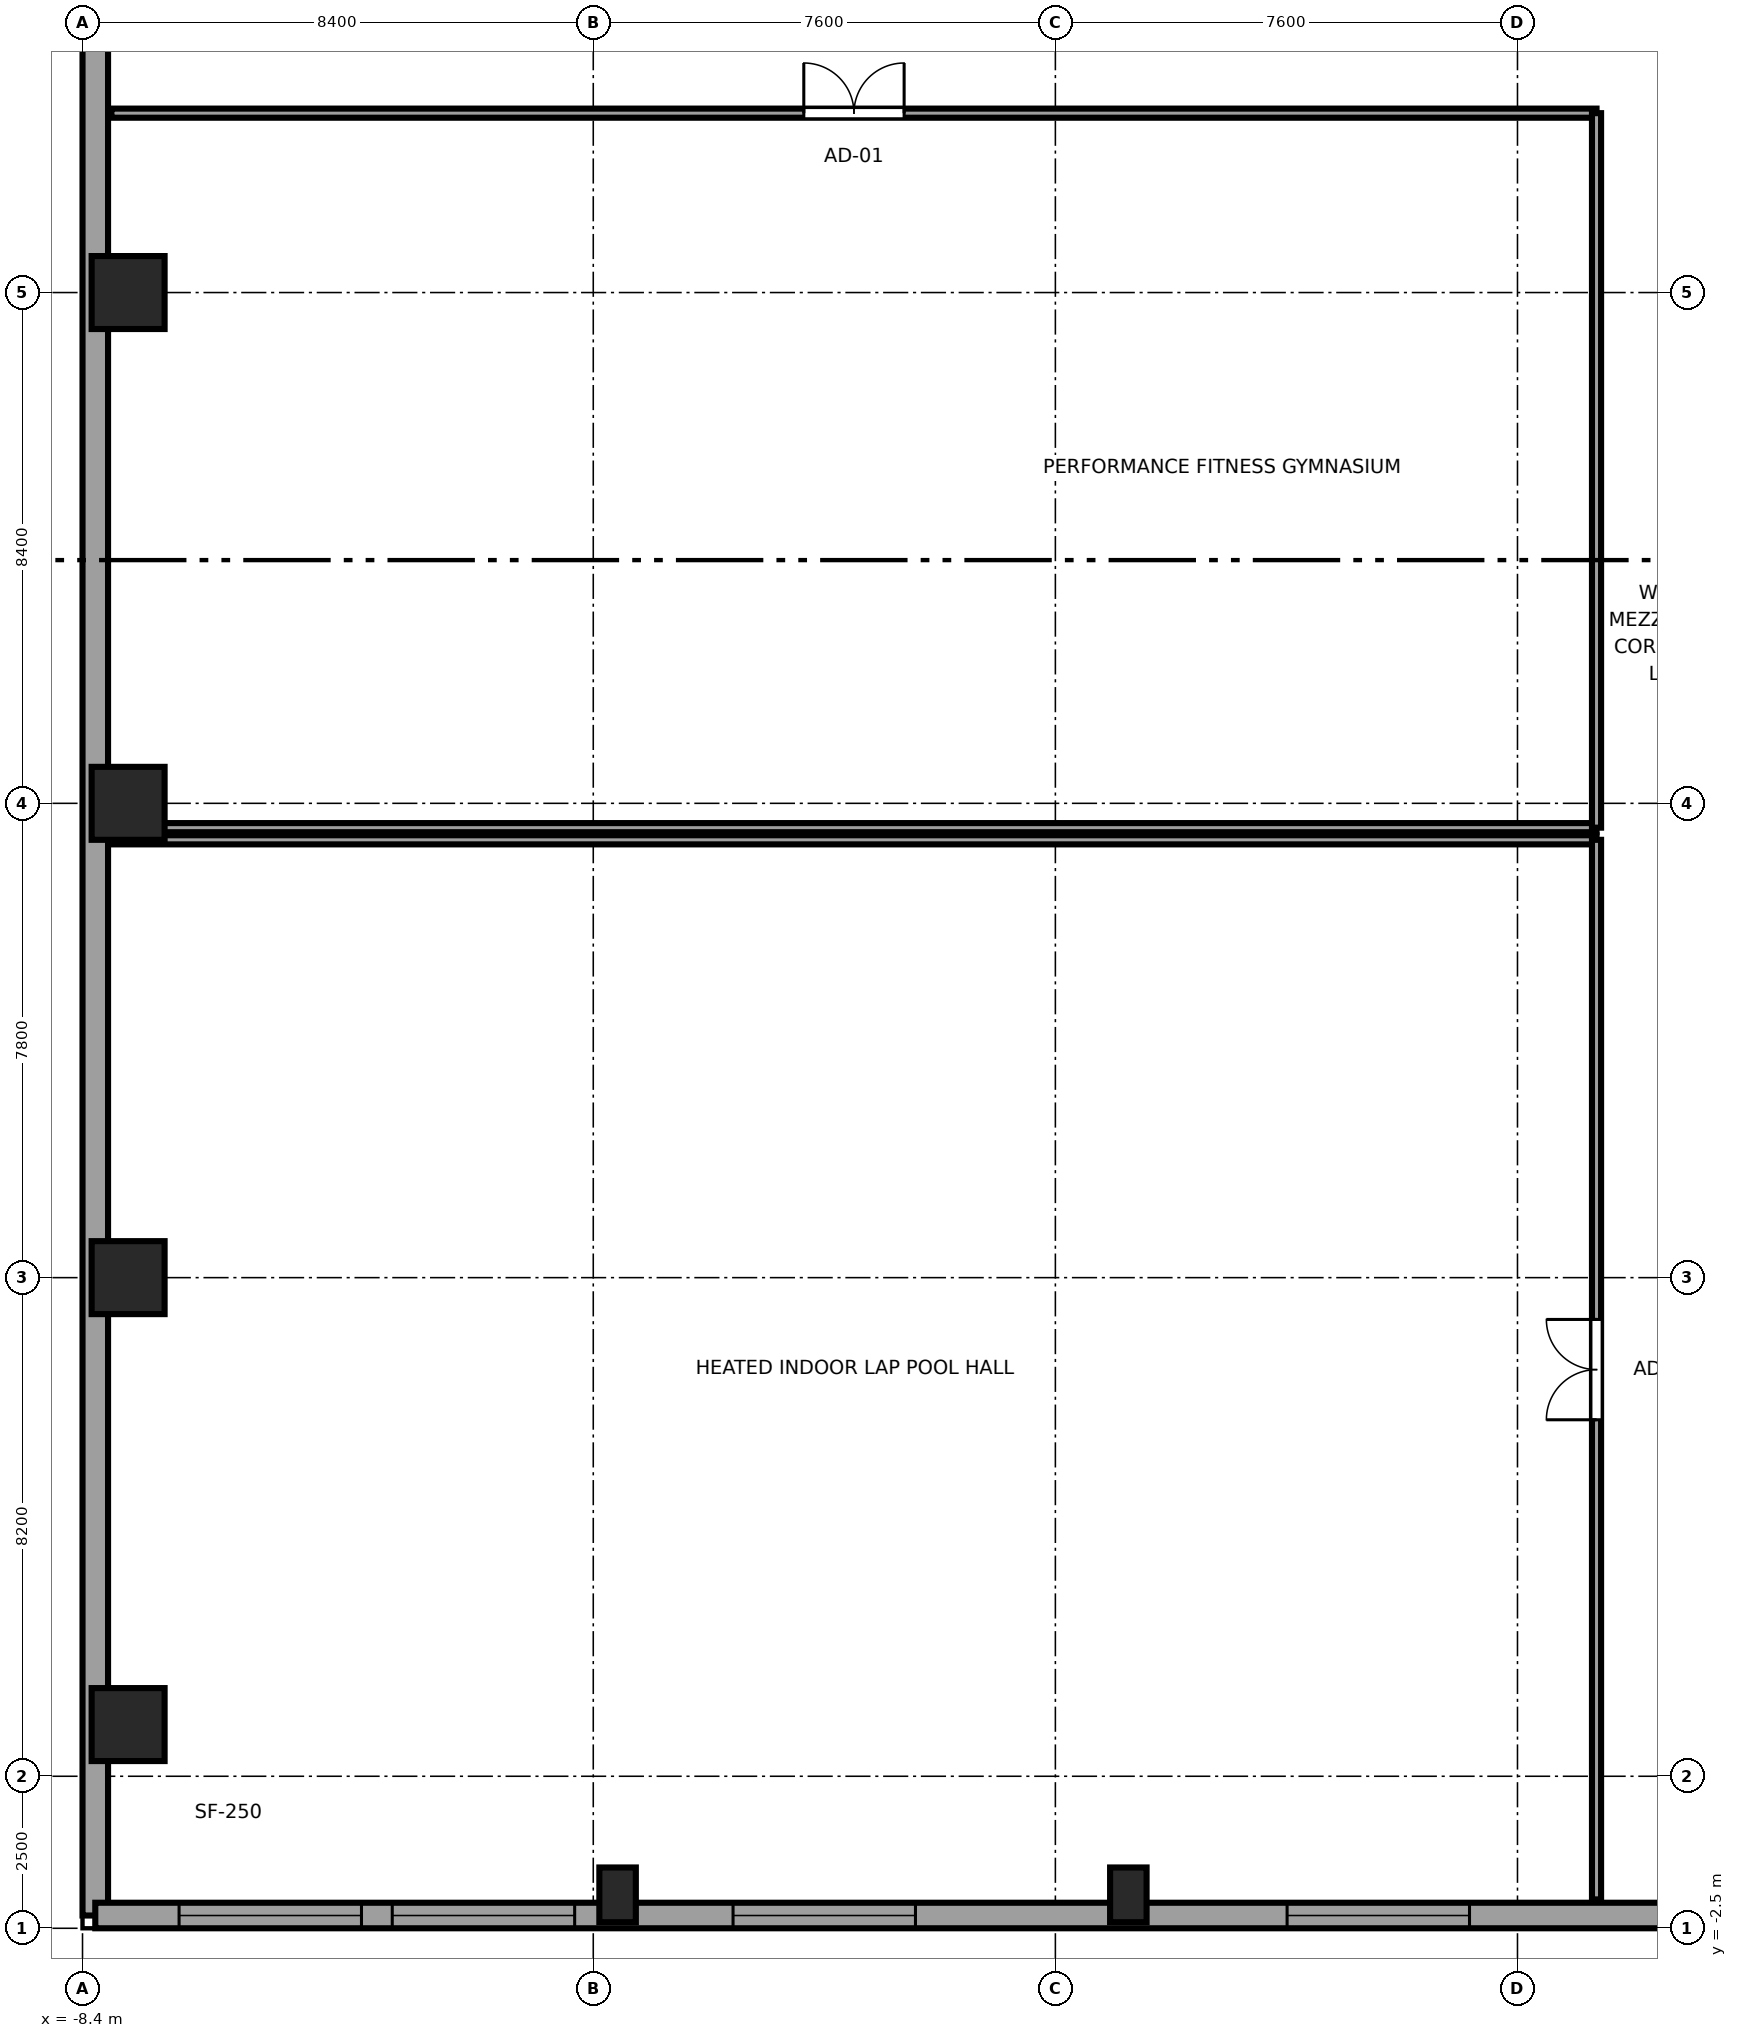
"""IFC4 building model, lengths in metres.
Left out: names, types, materials, properties, quantities, classifications, styles, units other than length and angle.
Written with IfcOpenShell. Run it as: python <this file> out.ifc"""

import sys

from ifc_helpers import new_model, si_unit, direction, frame, frame_2d, origin, origin_2d, place, context, subcontext, project, spatial, rectangle, extrude, source, transform, mapped, element, fill, save


model = new_model("IFC4")
c1 = context("Model", 3, precision=1e-05, world=origin(), true_north=direction((0.0, 1.0)))
c2 = subcontext(c1, "Body", "Model", "MODEL_VIEW")
j1 = project(units=[si_unit("LENGTHUNIT", "METRE"), si_unit("PLANEANGLEUNIT", "RADIAN")], contexts=[c1])
p1 = place(None, origin())
s1 = spatial("IfcSite", under=j1, at=p1, CompositionType="ELEMENT")
p2 = place(p1, origin())
s2 = spatial("IfcBuilding", under=s1, at=p2, CompositionType="ELEMENT")
p3 = place(p2, frame((0.0, 0.0, 26.8)))
s3 = spatial("IfcBuildingStorey", under=s2, at=p3, CompositionType="ELEMENT", Elevation=26.8)
m1 = source(origin(), c2, "Body", "SweptSolid", [
    extrude(rectangle(XDim=1.2, YDim=1.2, at=origin_2d()), origin(), (0.0, 0.0, 1.0), 5.2),
])
for number, where, z_axis, x_axis in (
    (1, (-7.65, 0.85, 0.0), (0.0, 0.0, 1.0), (1.0, 0.0, 0.0)),
    (2, (-7.65, 8.2, 0.0), (0.0, 0.0, 1.0), (1.0, 0.0, 0.0)),
    (3, (-7.65, 16.0, 0.0), (0.0, 0.0, 1.0), (1.0, 0.0, 0.0)),
    (4, (-7.65, 24.4, 0.0), (0.0, 0.0, 1.0), (1.0, 0.0, 0.0)),
):
    element("IfcColumn", number, at=place(p3, frame(where, z_axis=z_axis, x_axis=x_axis)), inside=s3, PredefinedType="COLUMN", context=c2, shape_type="MappedRepresentation", body=[
        mapped(m1, transform((0.0, 0.0, 0.0), x_axis=(1.0, 0.0, 0.0), y_axis=(0.0, 1.0, 0.0), z_axis=(0.0, 0.0, 1.0), scale=1.0)),
    ])
m2 = source(origin(), c2, "Body", "SweptSolid", [
    extrude(rectangle(XDim=0.6, YDim=0.9, at=origin_2d()), origin(), (0.0, 0.0, 1.0), 5.2),
])
for number, where, z_axis, x_axis in (
    (5, (0.4, -1.95, 0.0), (0.0, 0.0, 1.0), (1.0, 0.0, 0.0)),
    (6, (8.8, -1.95, 0.0), (0.0, 0.0, 1.0), (1.0, 0.0, 0.0)),
):
    element("IfcColumn", number, at=place(p3, frame(where, z_axis=z_axis, x_axis=x_axis)), inside=s3, PredefinedType="PILASTER", context=c2, shape_type="MappedRepresentation", body=[
        mapped(m2, transform((0.0, 0.0, 0.0), x_axis=(1.0, 0.0, 0.0), y_axis=(0.0, 1.0, 0.0), z_axis=(0.0, 0.0, 1.0), scale=1.0)),
    ])
p4 = place(p3, frame((-8.19, 48.29, 0.0), z_axis=(0.0, 0.0, 1.0), x_axis=(0.0, -1.0, 0.0)))
e7 = element("IfcWall", 7, at=p4, inside=s3, PredefinedType="SOLIDWALL", context=c2, shape_type="SweptSolid", body=[
    extrude(rectangle(XDim=50.58, YDim=0.42, at=frame_2d((25.29, 0.0))), origin(), (0.0, 0.0, 1.0), 4.94),
])
p5 = place(p3, frame((-8.19, -2.29, 0.0), z_axis=(0.0, 0.0, 1.0), x_axis=(1.0, 0.0, 0.0)))
e8 = element("IfcWall", 8, at=p5, inside=s3, PredefinedType="SOLIDWALL", context=c2, shape_type="SweptSolid", body=[
    extrude(rectangle(XDim=64.98, YDim=0.42, at=frame_2d((32.49, 0.0))), origin(), (0.0, 0.0, 1.0), 4.94),
])
p6 = place(p5, frame((1.378, 0.0, 0.65)))
e9 = element("IfcOpeningElement", 9, at=p6, cuts=e8, PredefinedType="OPENING", context=c2, shape_type="SweptSolid", body=[
    extrude(rectangle(XDim=3.0, YDim=2.5, at=frame_2d((1.5, 1.25))), frame((0.0, 0.22, 0.0), z_axis=(0.0, -1.0, 0.0), x_axis=(1.0, 0.0, 0.0)), (0.0, 0.0, 1.0), 0.44),
])
p7 = place(p5, frame((4.884, 0.0, 0.65)))
e10 = element("IfcOpeningElement", 10, at=p7, cuts=e8, PredefinedType="OPENING", context=c2, shape_type="SweptSolid", body=[
    extrude(rectangle(XDim=3.0, YDim=2.5, at=frame_2d((1.5, 1.25))), frame((0.0, 0.22, 0.0), z_axis=(0.0, -1.0, 0.0), x_axis=(1.0, 0.0, 0.0)), (0.0, 0.0, 1.0), 0.44),
])
p8 = place(p5, frame((10.489, 0.0, 0.65)))
e11 = element("IfcOpeningElement", 11, at=p8, cuts=e8, PredefinedType="OPENING", context=c2, shape_type="SweptSolid", body=[
    extrude(rectangle(XDim=3.0, YDim=2.5, at=frame_2d((1.5, 1.25))), frame((0.0, 0.22, 0.0), z_axis=(0.0, -1.0, 0.0), x_axis=(1.0, 0.0, 0.0)), (0.0, 0.0, 1.0), 0.44),
])
p9 = place(p5, frame((19.601, 0.0, 0.65)))
e12 = element("IfcOpeningElement", 12, at=p9, cuts=e8, PredefinedType="OPENING", context=c2, shape_type="SweptSolid", body=[
    extrude(rectangle(XDim=3.0, YDim=2.5, at=frame_2d((1.5, 1.25))), frame((0.0, 0.22, 0.0), z_axis=(0.0, -1.0, 0.0), x_axis=(1.0, 0.0, 0.0)), (0.0, 0.0, 1.0), 0.44),
])
p10 = place(p5, frame((28.712, 0.0, 0.65)))
e13 = element("IfcOpeningElement", 13, at=p10, cuts=e8, PredefinedType="OPENING", context=c2, shape_type="SweptSolid", body=[
    extrude(rectangle(XDim=3.0, YDim=2.5, at=frame_2d((1.5, 1.25))), frame((0.0, 0.22, 0.0), z_axis=(0.0, -1.0, 0.0), x_axis=(1.0, 0.0, 0.0)), (0.0, 0.0, 1.0), 0.44),
])
p11 = place(p5, frame((32.718, 0.0, 0.65)))
e14 = element("IfcOpeningElement", 14, at=p11, cuts=e8, PredefinedType="OPENING", context=c2, shape_type="SweptSolid", body=[
    extrude(rectangle(XDim=3.0, YDim=2.5, at=frame_2d((1.5, 1.25))), frame((0.0, 0.22, 0.0), z_axis=(0.0, -1.0, 0.0), x_axis=(1.0, 0.0, 0.0)), (0.0, 0.0, 1.0), 0.44),
])
p12 = place(p5, frame((37.824, 0.0, 0.65)))
e15 = element("IfcOpeningElement", 15, at=p12, cuts=e8, PredefinedType="OPENING", context=c2, shape_type="SweptSolid", body=[
    extrude(rectangle(XDim=3.0, YDim=2.5, at=frame_2d((1.5, 1.25))), frame((0.0, 0.22, 0.0), z_axis=(0.0, -1.0, 0.0), x_axis=(1.0, 0.0, 0.0)), (0.0, 0.0, 1.0), 0.44),
])
p13 = place(p5, frame((42.379, 0.0, 0.65)))
e16 = element("IfcOpeningElement", 16, at=p13, cuts=e8, PredefinedType="OPENING", context=c2, shape_type="SweptSolid", body=[
    extrude(rectangle(XDim=3.0, YDim=2.5, at=frame_2d((1.5, 1.25))), frame((0.0, 0.22, 0.0), z_axis=(0.0, -1.0, 0.0), x_axis=(1.0, 0.0, 0.0)), (0.0, 0.0, 1.0), 0.44),
])
p14 = place(p5, frame((46.935, 0.0, 0.65)))
e17 = element("IfcOpeningElement", 17, at=p14, cuts=e8, PredefinedType="OPENING", context=c2, shape_type="SweptSolid", body=[
    extrude(rectangle(XDim=3.0, YDim=2.5, at=frame_2d((1.5, 1.25))), frame((0.0, 0.22, 0.0), z_axis=(0.0, -1.0, 0.0), x_axis=(1.0, 0.0, 0.0)), (0.0, 0.0, 1.0), 0.44),
])
p15 = place(p5, frame((51.491, 0.0, 0.65)))
e18 = element("IfcOpeningElement", 18, at=p15, cuts=e8, PredefinedType="OPENING", context=c2, shape_type="SweptSolid", body=[
    extrude(rectangle(XDim=3.0, YDim=2.5, at=frame_2d((1.5, 1.25))), frame((0.0, 0.22, 0.0), z_axis=(0.0, -1.0, 0.0), x_axis=(1.0, 0.0, 0.0)), (0.0, 0.0, 1.0), 0.44),
])
p16 = place(p5, frame((60.602, 0.0, 0.65)))
e19 = element("IfcOpeningElement", 19, at=p16, cuts=e8, PredefinedType="OPENING", context=c2, shape_type="SweptSolid", body=[
    extrude(rectangle(XDim=3.0, YDim=2.5, at=frame_2d((1.5, 1.25))), frame((0.0, 0.22, 0.0), z_axis=(0.0, -1.0, 0.0), x_axis=(1.0, 0.0, 0.0)), (0.0, 0.0, 1.0), 0.44),
])
p17 = place(p3, frame((-7.925, 15.4, 0.0), z_axis=(0.0, 0.0, 1.0), x_axis=(1.0, 0.0, 0.0)))
e20 = element("IfcWall", 20, at=p17, inside=s3, PredefinedType="PARTITIONING", context=c2, shape_type="SweptSolid", body=[
    extrude(rectangle(XDim=24.425, YDim=0.15, at=frame_2d((12.212, 0.0))), origin(), (0.0, 0.0, 1.0), 4.94),
])
p18 = place(p3, frame((16.5, -2.025, 0.0), z_axis=(0.0, 0.0, 1.0), x_axis=(0.0, 1.0, 0.0)))
e21 = element("IfcWall", 21, at=p18, inside=s3, PredefinedType="PARTITIONING", context=c2, shape_type="SweptSolid", body=[
    extrude(rectangle(XDim=17.425, YDim=0.15, at=frame_2d((8.712, 0.0))), origin(), (0.0, 0.0, 1.0), 4.94),
])
p19 = place(p18, frame((7.887, 0.0, 0.0)))
e22 = element("IfcOpeningElement", 22, at=p19, cuts=e21, PredefinedType="OPENING", context=c2, shape_type="SweptSolid", body=[
    extrude(rectangle(XDim=1.65, YDim=2.15, at=frame_2d((0.825, 1.075))), frame((0.0, 0.085, 0.0), z_axis=(0.0, -1.0, 0.0), x_axis=(1.0, 0.0, 0.0)), (0.0, 0.0, 1.0), 0.17),
])
p20 = place(p3, frame((-7.925, 15.6, 0.0), z_axis=(0.0, 0.0, 1.0), x_axis=(1.0, 0.0, 0.0)))
e23 = element("IfcWall", 23, at=p20, inside=s3, PredefinedType="PARTITIONING", context=c2, shape_type="SweptSolid", body=[
    extrude(rectangle(XDim=24.425, YDim=0.15, at=frame_2d((12.212, 0.0))), origin(), (0.0, 0.0, 1.0), 4.94),
])
p21 = place(p3, frame((-7.925, 27.35, 0.0), z_axis=(0.0, 0.0, 1.0), x_axis=(1.0, 0.0, 0.0)))
e24 = element("IfcWall", 24, at=p21, inside=s3, PredefinedType="PARTITIONING", context=c2, shape_type="SweptSolid", body=[
    extrude(rectangle(XDim=24.425, YDim=0.15, at=frame_2d((12.212, 0.0))), origin(), (0.0, 0.0, 1.0), 4.94),
])
p22 = place(p21, frame((11.387, 0.0, 0.0)))
e25 = element("IfcOpeningElement", 25, at=p22, cuts=e24, PredefinedType="OPENING", context=c2, shape_type="SweptSolid", body=[
    extrude(rectangle(XDim=1.65, YDim=2.15, at=frame_2d((0.825, 1.075))), frame((0.0, 0.085, 0.0), z_axis=(0.0, -1.0, 0.0), x_axis=(1.0, 0.0, 0.0)), (0.0, 0.0, 1.0), 0.17),
])
p23 = place(p3, frame((16.5, 15.6, 0.0), z_axis=(0.0, 0.0, 1.0), x_axis=(0.0, 1.0, 0.0)))
e26 = element("IfcWall", 26, at=p23, inside=s3, PredefinedType="PARTITIONING", context=c2, shape_type="SweptSolid", body=[
    extrude(rectangle(XDim=11.75, YDim=0.15, at=frame_2d((5.875, 0.0))), origin(), (0.0, 0.0, 1.0), 4.94),
])
m3 = source(origin(), c2, "Body", "SweptSolid", [
    extrude(rectangle(XDim=3.0, YDim=2.5, at=frame_2d((1.5, 1.25))), frame((0.0, 0.09, 0.0), z_axis=(0.0, -1.0, 0.0), x_axis=(1.0, 0.0, 0.0)), (0.0, 0.0, 1.0), 0.06),
])
p24 = place(p6, origin())
e27 = element("IfcWindow", 27, at=p24, inside=s3, PartitioningType="TRIPLE_PANEL_HORIZONTAL", PredefinedType="WINDOW", context=c2, shape_type="MappedRepresentation", body=[
    mapped(m3, transform((0.0, 0.0, 0.0), x_axis=(1.0, 0.0, 0.0), y_axis=(0.0, 1.0, 0.0), z_axis=(0.0, 0.0, 1.0), scale=1.0)),
])
fill(e9, e27)
p25 = place(p7, origin())
e28 = element("IfcWindow", 28, at=p25, inside=s3, PartitioningType="TRIPLE_PANEL_HORIZONTAL", PredefinedType="WINDOW", context=c2, shape_type="MappedRepresentation", body=[
    mapped(m3, transform((0.0, 0.0, 0.0), x_axis=(1.0, 0.0, 0.0), y_axis=(0.0, 1.0, 0.0), z_axis=(0.0, 0.0, 1.0), scale=1.0)),
])
fill(e10, e28)
p26 = place(p8, origin())
e29 = element("IfcWindow", 29, at=p26, inside=s3, PartitioningType="TRIPLE_PANEL_HORIZONTAL", PredefinedType="WINDOW", context=c2, shape_type="MappedRepresentation", body=[
    mapped(m3, transform((0.0, 0.0, 0.0), x_axis=(1.0, 0.0, 0.0), y_axis=(0.0, 1.0, 0.0), z_axis=(0.0, 0.0, 1.0), scale=1.0)),
])
fill(e11, e29)
p27 = place(p9, origin())
e30 = element("IfcWindow", 30, at=p27, inside=s3, PartitioningType="TRIPLE_PANEL_HORIZONTAL", PredefinedType="WINDOW", context=c2, shape_type="MappedRepresentation", body=[
    mapped(m3, transform((0.0, 0.0, 0.0), x_axis=(1.0, 0.0, 0.0), y_axis=(0.0, 1.0, 0.0), z_axis=(0.0, 0.0, 1.0), scale=1.0)),
])
fill(e12, e30)
m4 = source(origin(), c2, "Body", "SweptSolid", [
    extrude(rectangle(XDim=1.65, YDim=2.15, at=frame_2d((0.825, 1.075))), frame((0.0, 0.025, 0.0), z_axis=(0.0, -1.0, 0.0), x_axis=(1.0, 0.0, 0.0)), (0.0, 0.0, 1.0), 0.05),
])
p28 = place(p19, origin())
e31 = element("IfcDoor", 31, at=p28, inside=s3, OperationType="DOUBLE_DOOR_SINGLE_SWING", PredefinedType="DOOR", context=c2, shape_type="MappedRepresentation", body=[
    mapped(m4, transform((0.0, 0.0, 0.0), x_axis=(1.0, 0.0, 0.0), y_axis=(0.0, 1.0, 0.0), z_axis=(0.0, 0.0, 1.0), scale=1.0)),
])
fill(e22, e31)
p29 = place(p22, origin())
e32 = element("IfcDoor", 32, at=p29, inside=s3, OperationType="DOUBLE_DOOR_SINGLE_SWING", PredefinedType="DOOR", context=c2, shape_type="MappedRepresentation", body=[
    mapped(m4, transform((0.0, 0.0, 0.0), x_axis=(1.0, 0.0, 0.0), y_axis=(0.0, 1.0, 0.0), z_axis=(0.0, 0.0, 1.0), scale=1.0)),
])
fill(e25, e32)
save(model, sys.argv[1])
